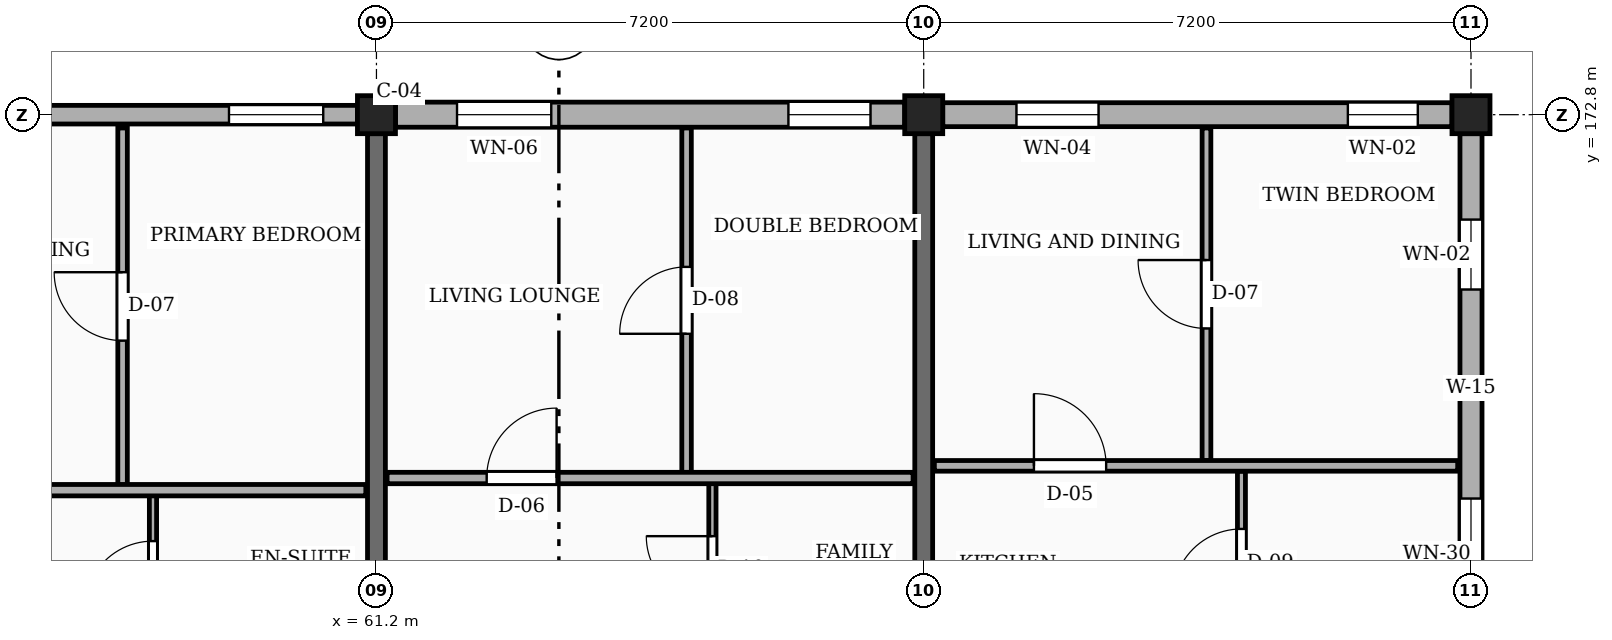
"""IFC4 building model, lengths in metres.
Left out: names, types, materials, properties, quantities, classifications, styles, units other than length and angle.
Written with IfcOpenShell. Run it as: python <this file> out.ifc"""

import sys

from ifc_helpers import new_model, si_unit, direction, frame, frame_2d, origin, origin_2d, place, context, subcontext, project, spatial, rectangle, extrude, element, fill, save


model = new_model("IFC4")
c1 = context("Model", 3, precision=1e-05, world=origin(), true_north=direction((0.0, 1.0)))
c2 = subcontext(c1, "Body", "Model", "MODEL_VIEW")
j1 = project(units=[si_unit("LENGTHUNIT", "METRE"), si_unit("PLANEANGLEUNIT", "RADIAN")], contexts=[c1])
p1 = place(None, origin())
s1 = spatial("IfcSite", under=j1, at=p1, CompositionType="ELEMENT")
p2 = place(p1, origin())
s2 = spatial("IfcBuilding", under=s1, at=p2, CompositionType="ELEMENT")
p3 = place(p2, frame((0.0, 0.0, 23.4)))
s3 = spatial("IfcBuildingStorey", under=s2, at=p3, CompositionType="ELEMENT", Elevation=23.4)
for number, where, z_axis, x_axis in (
    (1, (61.2, 172.8, 0.0), (0.0, 0.0, 1.0), (1.0, 0.0, 0.0)),
    (2, (68.4, 172.8, 0.0), (0.0, 0.0, 1.0), (1.0, 0.0, 0.0)),
    (3, (75.6, 172.8, 0.0), (0.0, 0.0, 1.0), (1.0, 0.0, 0.0)),
):
    element("IfcColumn", number, at=place(p3, frame(where, z_axis=z_axis, x_axis=x_axis)), inside=s3, PredefinedType="COLUMN", context=c2, shape_type="SweptSolid", body=[
        extrude(rectangle(XDim=0.5, YDim=0.5, at=origin_2d()), origin(), (0.0, 0.0, 1.0), 3.15),
    ])
for number, where, z_axis, x_axis in (
    (4, (61.2, 165.9, 0.0), (0.0, 0.0, 1.0), (0.0, 1.0, 0.0)),
    (5, (68.4, 165.9, 0.0), (0.0, 0.0, 1.0), (0.0, 1.0, 0.0)),
):
    element("IfcWall", number, at=place(p3, frame(where, z_axis=z_axis, x_axis=x_axis)), inside=s3, PredefinedType="SOLIDWALL", context=c2, shape_type="SweptSolid", body=[
        extrude(rectangle(XDim=6.65, YDim=0.235, at=frame_2d((3.325, 0.0))), origin(), (0.0, 0.0, 1.0), 2.185),
    ])
p4 = place(p3, frame((75.6, 165.85, 0.0), z_axis=(0.0, 0.0, 1.0), x_axis=(0.0, 1.0, 0.0)))
e6 = element("IfcWall", 6, at=p4, inside=s3, PredefinedType="SOLIDWALL", context=c2, shape_type="SweptSolid", body=[
    extrude(rectangle(XDim=6.7, YDim=0.29, at=frame_2d((3.35, 0.0))), origin(), (0.0, 0.0, 1.0), 2.455),
])
p5 = place(p4, frame((0.45, 0.0, 0.78)))
e7 = element("IfcOpeningElement", 7, at=p5, cuts=e6, PredefinedType="OPENING", context=c2, shape_type="SweptSolid", body=[
    extrude(rectangle(XDim=1.45, YDim=1.44, at=frame_2d((0.725, 0.72))), frame((0.0, 0.155, 0.0), z_axis=(0.0, -1.0, 0.0), x_axis=(1.0, 0.0, 0.0)), (0.0, 0.0, 1.0), 0.31),
])
p6 = place(p4, frame((4.65, 0.0, 0.78)))
e8 = element("IfcOpeningElement", 8, at=p6, cuts=e6, PredefinedType="OPENING", context=c2, shape_type="SweptSolid", body=[
    extrude(rectangle(XDim=0.92, YDim=1.15, at=frame_2d((0.46, 0.575))), frame((0.0, 0.155, 0.0), z_axis=(0.0, -1.0, 0.0), x_axis=(1.0, 0.0, 0.0)), (0.0, 0.0, 1.0), 0.31),
])
p7 = place(p3, frame((75.35, 172.8, 0.0), z_axis=(0.0, 0.0, 1.0), x_axis=(-1.0, 0.0, 0.0)))
e9 = element("IfcWall", 9, at=p7, inside=s3, PredefinedType="SOLIDWALL", context=c2, shape_type="SweptSolid", body=[
    extrude(rectangle(XDim=6.7, YDim=0.315, at=frame_2d((3.35, 0.0))), origin(), (0.0, 0.0, 1.0), 2.455),
])
p8 = place(p7, frame((0.45, 0.0, 0.78)))
e10 = element("IfcOpeningElement", 10, at=p8, cuts=e9, PredefinedType="OPENING", context=c2, shape_type="SweptSolid", body=[
    extrude(rectangle(XDim=0.92, YDim=1.15, at=frame_2d((0.46, 0.575))), frame((0.0, 0.167, 0.0), z_axis=(0.0, -1.0, 0.0), x_axis=(1.0, 0.0, 0.0)), (0.0, 0.0, 1.0), 0.335),
])
p9 = place(p7, frame((4.65, 0.0, 0.78)))
e11 = element("IfcOpeningElement", 11, at=p9, cuts=e9, PredefinedType="OPENING", context=c2, shape_type="SweptSolid", body=[
    extrude(rectangle(XDim=1.08, YDim=1.15, at=frame_2d((0.54, 0.575))), frame((0.0, 0.167, 0.0), z_axis=(0.0, -1.0, 0.0), x_axis=(1.0, 0.0, 0.0)), (0.0, 0.0, 1.0), 0.335),
])
p10 = place(p3, frame((68.15, 172.8, 0.0), z_axis=(0.0, 0.0, 1.0), x_axis=(-1.0, 0.0, 0.0)))
e12 = element("IfcWall", 12, at=p10, inside=s3, PredefinedType="SOLIDWALL", context=c2, shape_type="SweptSolid", body=[
    extrude(rectangle(XDim=6.7, YDim=0.33, at=frame_2d((3.35, 0.0))), origin(), (0.0, 0.0, 1.0), 2.455),
])
p11 = place(p10, frame((0.45, 0.0, 0.78)))
e13 = element("IfcOpeningElement", 13, at=p11, cuts=e12, PredefinedType="OPENING", context=c2, shape_type="SweptSolid", body=[
    extrude(rectangle(XDim=1.08, YDim=1.15, at=frame_2d((0.54, 0.575))), frame((0.0, 0.175, 0.0), z_axis=(0.0, -1.0, 0.0), x_axis=(1.0, 0.0, 0.0)), (0.0, 0.0, 1.0), 0.35),
])
p12 = place(p10, frame((4.65, 0.0, 0.78)))
e14 = element("IfcOpeningElement", 14, at=p12, cuts=e12, PredefinedType="OPENING", context=c2, shape_type="SweptSolid", body=[
    extrude(rectangle(XDim=1.24, YDim=1.15, at=frame_2d((0.62, 0.575))), frame((0.0, 0.175, 0.0), z_axis=(0.0, -1.0, 0.0), x_axis=(1.0, 0.0, 0.0)), (0.0, 0.0, 1.0), 0.35),
])
p13 = place(p3, frame((60.95, 172.8, 0.0), z_axis=(0.0, 0.0, 1.0), x_axis=(-1.0, 0.0, 0.0)))
e15 = element("IfcWall", 15, at=p13, inside=s3, PredefinedType="SOLIDWALL", context=c2, shape_type="SweptSolid", body=[
    extrude(rectangle(XDim=6.7, YDim=0.245, at=frame_2d((3.35, 0.0))), origin(), (0.0, 0.0, 1.0), 2.455),
])
p14 = place(p13, frame((0.45, 0.0, 0.78)))
e16 = element("IfcOpeningElement", 16, at=p14, cuts=e15, PredefinedType="OPENING", context=c2, shape_type="SweptSolid", body=[
    extrude(rectangle(XDim=1.24, YDim=1.15, at=frame_2d((0.62, 0.575))), frame((0.0, 0.133, 0.0), z_axis=(0.0, -1.0, 0.0), x_axis=(1.0, 0.0, 0.0)), (0.0, 0.0, 1.0), 0.265),
])
p15 = place(p13, frame((4.65, 0.0, 0.78)))
e17 = element("IfcOpeningElement", 17, at=p15, cuts=e15, PredefinedType="OPENING", context=c2, shape_type="SweptSolid", body=[
    extrude(rectangle(XDim=1.4, YDim=1.15, at=frame_2d((0.7, 0.575))), frame((0.0, 0.133, 0.0), z_axis=(0.0, -1.0, 0.0), x_axis=(1.0, 0.0, 0.0)), (0.0, 0.0, 1.0), 0.265),
])
p16 = place(p3, frame((57.86, 167.93, 0.0), z_axis=(0.0, 0.0, 1.0), x_axis=(0.0, 1.0, 0.0)))
e18 = element("IfcWall", 18, at=p16, inside=s3, PredefinedType="PARTITIONING", context=c2, shape_type="SweptSolid", body=[
    extrude(rectangle(XDim=4.695, YDim=0.125, at=frame_2d((2.348, 0.0))), origin(), (0.0, 0.0, 1.0), 2.32),
])
p17 = place(p16, frame((1.897, 0.0, 0.0)))
e19 = element("IfcOpeningElement", 19, at=p17, cuts=e18, PredefinedType="OPENING", context=c2, shape_type="SweptSolid", body=[
    extrude(rectangle(XDim=0.9, YDim=2.1, at=frame_2d((0.45, 1.05))), frame((0.0, 0.073, 0.0), z_axis=(0.0, -1.0, 0.0), x_axis=(1.0, 0.0, 0.0)), (0.0, 0.0, 1.0), 0.145),
])
p18 = place(p3, frame((58.26, 165.69, 0.0), z_axis=(0.0, 0.0, 1.0), x_axis=(0.0, 1.0, 0.0)))
e20 = element("IfcWall", 20, at=p18, inside=s3, PredefinedType="PARTITIONING", context=c2, shape_type="SweptSolid", body=[
    extrude(rectangle(XDim=2.1, YDim=0.095, at=frame_2d((1.05, 0.0))), origin(), (0.0, 0.0, 1.0), 2.32),
])
p19 = place(p18, frame((0.6, 0.0, 0.0)))
e21 = element("IfcOpeningElement", 21, at=p19, cuts=e20, PredefinedType="OPENING", context=c2, shape_type="SweptSolid", body=[
    extrude(rectangle(XDim=0.9, YDim=2.05, at=frame_2d((0.45, 1.025))), frame((0.0, 0.058, 0.0), z_axis=(0.0, -1.0, 0.0), x_axis=(1.0, 0.0, 0.0)), (0.0, 0.0, 1.0), 0.115),
])
p20 = place(p3, frame((54.14, 167.86, 0.0), z_axis=(0.0, 0.0, 1.0), x_axis=(1.0, 0.0, 0.0)))
e22 = element("IfcWall", 22, at=p20, inside=s3, PredefinedType="PARTITIONING", context=c2, shape_type="SweptSolid", body=[
    extrude(rectangle(XDim=6.92, YDim=0.15, at=frame_2d((3.46, 0.0))), origin(), (0.0, 0.0, 1.0), 2.32),
])
p21 = place(p20, frame((1.31, 0.0, 0.0)))
e23 = element("IfcOpeningElement", 23, at=p21, cuts=e22, PredefinedType="OPENING", context=c2, shape_type="SweptSolid", body=[
    extrude(rectangle(XDim=0.95, YDim=2.1, at=frame_2d((0.475, 1.05))), frame((0.0, 0.085, 0.0), z_axis=(0.0, -1.0, 0.0), x_axis=(1.0, 0.0, 0.0)), (0.0, 0.0, 1.0), 0.17),
])
p22 = place(p3, frame((65.28, 168.09, 0.0), z_axis=(0.0, 0.0, 1.0), x_axis=(0.0, 1.0, 0.0)))
e24 = element("IfcWall", 24, at=p22, inside=s3, PredefinedType="PARTITIONING", context=c2, shape_type="SweptSolid", body=[
    extrude(rectangle(XDim=4.535, YDim=0.125, at=frame_2d((2.268, 0.0))), origin(), (0.0, 0.0, 1.0), 2.32),
])
p23 = place(p22, frame((1.827, 0.0, 0.0)))
e25 = element("IfcOpeningElement", 25, at=p23, cuts=e24, PredefinedType="OPENING", context=c2, shape_type="SweptSolid", body=[
    extrude(rectangle(XDim=0.88, YDim=2.08, at=frame_2d((0.44, 1.04))), frame((0.0, 0.073, 0.0), z_axis=(0.0, -1.0, 0.0), x_axis=(1.0, 0.0, 0.0)), (0.0, 0.0, 1.0), 0.145),
])
p24 = place(p3, frame((65.62, 165.69, 0.0), z_axis=(0.0, 0.0, 1.0), x_axis=(0.0, 1.0, 0.0)))
e26 = element("IfcWall", 26, at=p24, inside=s3, PredefinedType="PARTITIONING", context=c2, shape_type="SweptSolid", body=[
    extrude(rectangle(XDim=2.26, YDim=0.095, at=frame_2d((1.13, 0.0))), origin(), (0.0, 0.0, 1.0), 2.32),
])
p25 = place(p24, frame((0.695, 0.0, 0.0)))
e27 = element("IfcOpeningElement", 27, at=p25, cuts=e26, PredefinedType="OPENING", context=c2, shape_type="SweptSolid", body=[
    extrude(rectangle(XDim=0.87, YDim=2.05, at=frame_2d((0.435, 1.025))), frame((0.0, 0.058, 0.0), z_axis=(0.0, -1.0, 0.0), x_axis=(1.0, 0.0, 0.0)), (0.0, 0.0, 1.0), 0.115),
])
p26 = place(p3, frame((61.34, 168.02, 0.0), z_axis=(0.0, 0.0, 1.0), x_axis=(1.0, 0.0, 0.0)))
e28 = element("IfcWall", 28, at=p26, inside=s3, PredefinedType="PARTITIONING", context=c2, shape_type="SweptSolid", body=[
    extrude(rectangle(XDim=6.92, YDim=0.15, at=frame_2d((3.46, 0.0))), origin(), (0.0, 0.0, 1.0), 2.32),
])
p27 = place(p26, frame((1.31, 0.0, 0.0)))
e29 = element("IfcOpeningElement", 29, at=p27, cuts=e28, PredefinedType="OPENING", context=c2, shape_type="SweptSolid", body=[
    extrude(rectangle(XDim=0.92, YDim=2.1, at=frame_2d((0.46, 1.05))), frame((0.0, 0.085, 0.0), z_axis=(0.0, -1.0, 0.0), x_axis=(1.0, 0.0, 0.0)), (0.0, 0.0, 1.0), 0.17),
])
p28 = place(p3, frame((72.12, 168.25, 0.0), z_axis=(0.0, 0.0, 1.0), x_axis=(0.0, 1.0, 0.0)))
e30 = element("IfcWall", 30, at=p28, inside=s3, PredefinedType="PARTITIONING", context=c2, shape_type="SweptSolid", body=[
    extrude(rectangle(XDim=4.375, YDim=0.115, at=frame_2d((2.188, 0.0))), origin(), (0.0, 0.0, 1.0), 2.32),
])
p29 = place(p28, frame((1.738, 0.0, 0.0)))
e31 = element("IfcOpeningElement", 31, at=p29, cuts=e30, PredefinedType="OPENING", context=c2, shape_type="SweptSolid", body=[
    extrude(rectangle(XDim=0.9, YDim=2.1, at=frame_2d((0.45, 1.05))), frame((0.0, 0.067, 0.0), z_axis=(0.0, -1.0, 0.0), x_axis=(1.0, 0.0, 0.0)), (0.0, 0.0, 1.0), 0.135),
])
p30 = place(p3, frame((72.58, 165.69, 0.0), z_axis=(0.0, 0.0, 1.0), x_axis=(0.0, 1.0, 0.0)))
e32 = element("IfcWall", 32, at=p30, inside=s3, PredefinedType="PARTITIONING", context=c2, shape_type="SweptSolid", body=[
    extrude(rectangle(XDim=2.42, YDim=0.105, at=frame_2d((1.21, 0.0))), origin(), (0.0, 0.0, 1.0), 2.32),
])
p31 = place(p30, frame((0.76, 0.0, 0.0)))
e33 = element("IfcOpeningElement", 33, at=p31, cuts=e32, PredefinedType="OPENING", context=c2, shape_type="SweptSolid", body=[
    extrude(rectangle(XDim=0.9, YDim=2.05, at=frame_2d((0.45, 1.025))), frame((0.0, 0.062, 0.0), z_axis=(0.0, -1.0, 0.0), x_axis=(1.0, 0.0, 0.0)), (0.0, 0.0, 1.0), 0.125),
])
p32 = place(p3, frame((68.54, 168.18, 0.0), z_axis=(0.0, 0.0, 1.0), x_axis=(1.0, 0.0, 0.0)))
e34 = element("IfcWall", 34, at=p32, inside=s3, PredefinedType="PARTITIONING", context=c2, shape_type="SweptSolid", body=[
    extrude(rectangle(XDim=6.885, YDim=0.14, at=frame_2d((3.442, 0.0))), origin(), (0.0, 0.0, 1.0), 2.32),
])
p33 = place(p32, frame((1.31, 0.0, 0.0)))
e35 = element("IfcOpeningElement", 35, at=p33, cuts=e34, PredefinedType="OPENING", context=c2, shape_type="SweptSolid", body=[
    extrude(rectangle(XDim=0.95, YDim=2.1, at=frame_2d((0.475, 1.05))), frame((0.0, 0.08, 0.0), z_axis=(0.0, -1.0, 0.0), x_axis=(1.0, 0.0, 0.0)), (0.0, 0.0, 1.0), 0.16),
])
p34 = place(p5, origin())
e36 = element("IfcWindow", 36, at=p34, inside=s3, PartitioningType="SINGLE_PANEL", PredefinedType="WINDOW", context=c2, shape_type="SweptSolid", body=[
    extrude(rectangle(XDim=1.45, YDim=1.44, at=frame_2d((0.725, 0.72))), frame((0.0, 0.03, 0.0), z_axis=(0.0, -1.0, 0.0), x_axis=(1.0, 0.0, 0.0)), (0.0, 0.0, 1.0), 0.06),
])
fill(e7, e36)
p35 = place(p6, origin())
e37 = element("IfcWindow", 37, at=p35, inside=s3, PartitioningType="SINGLE_PANEL", PredefinedType="WINDOW", context=c2, shape_type="SweptSolid", body=[
    extrude(rectangle(XDim=0.92, YDim=1.15, at=frame_2d((0.46, 0.575))), frame((0.0, 0.03, 0.0), z_axis=(0.0, -1.0, 0.0), x_axis=(1.0, 0.0, 0.0)), (0.0, 0.0, 1.0), 0.06),
])
fill(e8, e37)
p36 = place(p8, origin())
e38 = element("IfcWindow", 38, at=p36, inside=s3, PartitioningType="SINGLE_PANEL", PredefinedType="WINDOW", context=c2, shape_type="SweptSolid", body=[
    extrude(rectangle(XDim=0.92, YDim=1.15, at=frame_2d((0.46, 0.575))), frame((0.0, 0.03, 0.0), z_axis=(0.0, -1.0, 0.0), x_axis=(1.0, 0.0, 0.0)), (0.0, 0.0, 1.0), 0.06),
])
fill(e10, e38)
p37 = place(p9, origin())
e39 = element("IfcWindow", 39, at=p37, inside=s3, PartitioningType="SINGLE_PANEL", PredefinedType="WINDOW", context=c2, shape_type="SweptSolid", body=[
    extrude(rectangle(XDim=1.08, YDim=1.15, at=frame_2d((0.54, 0.575))), frame((0.0, 0.03, 0.0), z_axis=(0.0, -1.0, 0.0), x_axis=(1.0, 0.0, 0.0)), (0.0, 0.0, 1.0), 0.06),
])
fill(e11, e39)
p38 = place(p11, origin())
e40 = element("IfcWindow", 40, at=p38, inside=s3, PartitioningType="SINGLE_PANEL", PredefinedType="WINDOW", context=c2, shape_type="SweptSolid", body=[
    extrude(rectangle(XDim=1.08, YDim=1.15, at=frame_2d((0.54, 0.575))), frame((0.0, 0.03, 0.0), z_axis=(0.0, -1.0, 0.0), x_axis=(1.0, 0.0, 0.0)), (0.0, 0.0, 1.0), 0.06),
])
fill(e13, e40)
p39 = place(p12, origin())
e41 = element("IfcWindow", 41, at=p39, inside=s3, PartitioningType="SINGLE_PANEL", PredefinedType="WINDOW", context=c2, shape_type="SweptSolid", body=[
    extrude(rectangle(XDim=1.24, YDim=1.15, at=frame_2d((0.62, 0.575))), frame((0.0, 0.03, 0.0), z_axis=(0.0, -1.0, 0.0), x_axis=(1.0, 0.0, 0.0)), (0.0, 0.0, 1.0), 0.06),
])
fill(e14, e41)
p40 = place(p14, origin())
e42 = element("IfcWindow", 42, at=p40, inside=s3, PartitioningType="SINGLE_PANEL", PredefinedType="WINDOW", context=c2, shape_type="SweptSolid", body=[
    extrude(rectangle(XDim=1.24, YDim=1.15, at=frame_2d((0.62, 0.575))), frame((0.0, 0.03, 0.0), z_axis=(0.0, -1.0, 0.0), x_axis=(1.0, 0.0, 0.0)), (0.0, 0.0, 1.0), 0.06),
])
fill(e16, e42)
p41 = place(p17, origin())
e43 = element("IfcDoor", 43, at=p41, inside=s3, OperationType="SINGLE_SWING_RIGHT", PredefinedType="DOOR", context=c2, shape_type="SweptSolid", body=[
    extrude(rectangle(XDim=0.9, YDim=2.1, at=frame_2d((0.45, 1.05))), frame((0.0, 0.025, 0.0), z_axis=(0.0, -1.0, 0.0), x_axis=(1.0, 0.0, 0.0)), (0.0, 0.0, 1.0), 0.05),
])
fill(e19, e43)
p42 = place(p19, origin())
e44 = element("IfcDoor", 44, at=p42, inside=s3, OperationType="SINGLE_SWING_LEFT", PredefinedType="DOOR", context=c2, shape_type="SweptSolid", body=[
    extrude(rectangle(XDim=0.9, YDim=2.05, at=frame_2d((0.45, 1.025))), frame((0.0, 0.025, 0.0), z_axis=(0.0, -1.0, 0.0), x_axis=(1.0, 0.0, 0.0)), (0.0, 0.0, 1.0), 0.05),
])
fill(e21, e44)
p43 = place(p23, origin())
e45 = element("IfcDoor", 45, at=p43, inside=s3, OperationType="SINGLE_SWING_LEFT", PredefinedType="DOOR", context=c2, shape_type="SweptSolid", body=[
    extrude(rectangle(XDim=0.88, YDim=2.08, at=frame_2d((0.44, 1.04))), frame((0.0, 0.025, 0.0), z_axis=(0.0, -1.0, 0.0), x_axis=(1.0, 0.0, 0.0)), (0.0, 0.0, 1.0), 0.05),
])
fill(e25, e45)
p44 = place(p25, origin())
e46 = element("IfcDoor", 46, at=p44, inside=s3, OperationType="SINGLE_SWING_RIGHT", PredefinedType="DOOR", context=c2, shape_type="SweptSolid", body=[
    extrude(rectangle(XDim=0.87, YDim=2.05, at=frame_2d((0.435, 1.025))), frame((0.0, 0.025, 0.0), z_axis=(0.0, -1.0, 0.0), x_axis=(1.0, 0.0, 0.0)), (0.0, 0.0, 1.0), 0.05),
])
fill(e27, e46)
p45 = place(p27, origin())
e47 = element("IfcDoor", 47, at=p45, inside=s3, OperationType="SINGLE_SWING_RIGHT", PredefinedType="DOOR", context=c2, shape_type="SweptSolid", body=[
    extrude(rectangle(XDim=0.92, YDim=2.1, at=frame_2d((0.46, 1.05))), frame((0.0, 0.025, 0.0), z_axis=(0.0, -1.0, 0.0), x_axis=(1.0, 0.0, 0.0)), (0.0, 0.0, 1.0), 0.05),
])
fill(e29, e47)
p46 = place(p29, origin())
e48 = element("IfcDoor", 48, at=p46, inside=s3, OperationType="SINGLE_SWING_RIGHT", PredefinedType="DOOR", context=c2, shape_type="SweptSolid", body=[
    extrude(rectangle(XDim=0.9, YDim=2.1, at=frame_2d((0.45, 1.05))), frame((0.0, 0.025, 0.0), z_axis=(0.0, -1.0, 0.0), x_axis=(1.0, 0.0, 0.0)), (0.0, 0.0, 1.0), 0.05),
])
fill(e31, e48)
p47 = place(p31, origin())
e49 = element("IfcDoor", 49, at=p47, inside=s3, OperationType="SINGLE_SWING_LEFT", PredefinedType="DOOR", context=c2, shape_type="SweptSolid", body=[
    extrude(rectangle(XDim=0.9, YDim=2.05, at=frame_2d((0.45, 1.025))), frame((0.0, 0.025, 0.0), z_axis=(0.0, -1.0, 0.0), x_axis=(1.0, 0.0, 0.0)), (0.0, 0.0, 1.0), 0.05),
])
fill(e33, e49)
p48 = place(p33, origin())
e50 = element("IfcDoor", 50, at=p48, inside=s3, OperationType="SINGLE_SWING_LEFT", PredefinedType="DOOR", context=c2, shape_type="SweptSolid", body=[
    extrude(rectangle(XDim=0.95, YDim=2.1, at=frame_2d((0.475, 1.05))), frame((0.0, 0.025, 0.0), z_axis=(0.0, -1.0, 0.0), x_axis=(1.0, 0.0, 0.0)), (0.0, 0.0, 1.0), 0.05),
])
fill(e35, e50)
save(model, sys.argv[1])
